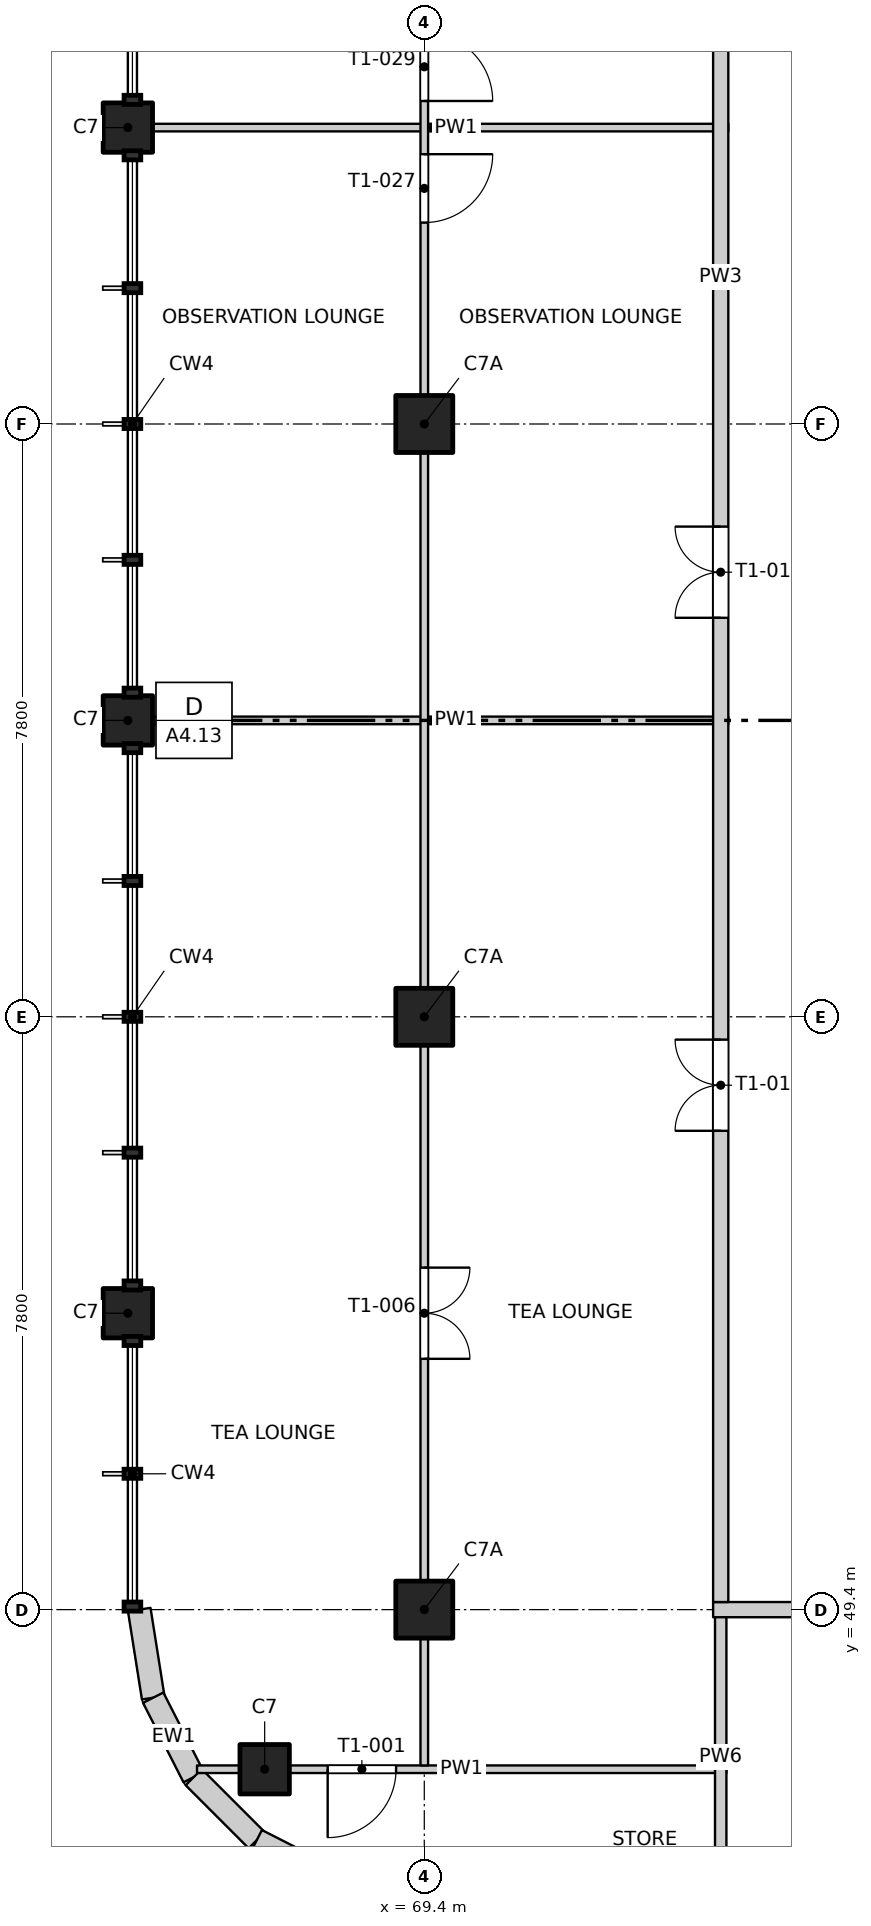
"""IFC4 building model, lengths in metres.
Left out: names, types, materials, properties, quantities, classifications, styles, units other than length and angle.
Written with IfcOpenShell. Run it as: python <this file> out.ifc"""

import sys

from ifc_helpers import new_model, si_unit, direction, frame, frame_2d, origin, origin_2d, place, context, subcontext, project, spatial, rectangle, extrude, element, fill, save


model = new_model("IFC4")
c1 = context("Model", 3, precision=1e-05, world=origin(), true_north=direction((0.0, 1.0)))
c2 = subcontext(c1, "Body", "Model", "MODEL_VIEW")
j1 = project(units=[si_unit("LENGTHUNIT", "METRE"), si_unit("PLANEANGLEUNIT", "RADIAN")], contexts=[c1])
p1 = place(None, origin())
s1 = spatial("IfcSite", under=j1, at=p1, CompositionType="ELEMENT")
p2 = place(p1, origin())
s2 = spatial("IfcBuilding", under=s1, at=p2, CompositionType="ELEMENT")
p3 = place(p2, frame((0.0, 0.0, 263.0)))
s3 = spatial("IfcBuildingStorey", under=s2, at=p3, CompositionType="ELEMENT", Elevation=263.0)
for number, where, z_axis, x_axis in (
    (1, (67.3, 47.3, -0.25), (0.0, 0.0, 1.0), (1.0, 0.0, 0.0)),
    (2, (65.5, 53.3, -0.25), (0.0, 0.0, 1.0), (1.0, 0.0, 0.0)),
    (3, (65.5, 61.1, -0.25), (0.0, 0.0, 1.0), (1.0, 0.0, 0.0)),
    (4, (65.5, 68.9, -0.25), (0.0, 0.0, 1.0), (1.0, 0.0, 0.0)),
):
    element("IfcColumn", number, at=place(p3, frame(where, z_axis=z_axis, x_axis=x_axis)), inside=s3, PredefinedType="COLUMN", context=c2, shape_type="SweptSolid", body=[
        extrude(rectangle(XDim=0.65, YDim=0.65, at=origin_2d()), origin(), (0.0, 0.0, 1.0), 3.35),
    ])
for number, where, z_axis, x_axis in (
    (5, (69.4, 49.4, -0.25), (0.0, 0.0, 1.0), (1.0, 0.0, 0.0)),
    (6, (69.4, 57.2, -0.25), (0.0, 0.0, 1.0), (1.0, 0.0, 0.0)),
    (7, (69.4, 65.0, -0.25), (0.0, 0.0, 1.0), (1.0, 0.0, 0.0)),
):
    element("IfcColumn", number, at=place(p3, frame(where, z_axis=z_axis, x_axis=x_axis)), inside=s3, PredefinedType="COLUMN", context=c2, shape_type="SweptSolid", body=[
        extrude(rectangle(XDim=0.75, YDim=0.75, at=origin_2d()), origin(), (0.0, 0.0, 1.0), 3.35),
    ])
p4 = place(p3, frame((65.65, 49.4, 0.0), z_axis=(0.0, 0.0, 1.0), x_axis=(0.156496880861, -0.987678452879, 0.0)))
e8 = element("IfcWall", 8, at=p4, inside=s3, PredefinedType="SOLIDWALL", context=c2, shape_type="SweptSolid", body=[
    extrude(rectangle(XDim=1.173, YDim=0.3, at=frame_2d((0.586, 0.0))), origin(), (0.0, 0.0, 1.0), 3.1),
])
p5 = place(p3, frame((65.833, 48.241, 0.0), z_axis=(0.0, 0.0, 1.0), x_axis=(0.454025524128, -0.890988677504, 0.0)))
e9 = element("IfcWall", 9, at=p5, inside=s3, PredefinedType="SOLIDWALL", context=c2, shape_type="SweptSolid", body=[
    extrude(rectangle(XDim=1.173, YDim=0.3, at=frame_2d((0.587, 0.0))), origin(), (0.0, 0.0, 1.0), 3.1),
])
p6 = place(p3, frame((66.366, 47.196, 0.0), z_axis=(0.0, 0.0, 1.0), x_axis=(0.707106781187, -0.707106781187, 0.0)))
e10 = element("IfcWall", 10, at=p6, inside=s3, PredefinedType="SOLIDWALL", context=c2, shape_type="SweptSolid", body=[
    extrude(rectangle(XDim=1.173, YDim=0.3, at=frame_2d((0.586, 0.0))), origin(), (0.0, 0.0, 1.0), 3.1),
])
p7 = place(p3, frame((67.196, 46.366, 0.0), z_axis=(0.0, 0.0, 1.0), x_axis=(0.890988677504, -0.454025524128, 0.0)))
e11 = element("IfcWall", 11, at=p7, inside=s3, PredefinedType="SOLIDWALL", context=c2, shape_type="SweptSolid", body=[
    extrude(rectangle(XDim=1.173, YDim=0.3, at=frame_2d((0.587, 0.0))), origin(), (0.0, 0.0, 1.0), 3.1),
])
p8 = place(p3, frame((66.41, 47.3, 0.0), z_axis=(0.0, 0.0, 1.0), x_axis=(1.0, 0.0, 0.0)))
e12 = element("IfcWall", 12, at=p8, inside=s3, PredefinedType="PARTITIONING", context=c2, shape_type="SweptSolid", body=[
    extrude(rectangle(XDim=6.965, YDim=0.1, at=frame_2d((3.482, 0.0))), origin(), (0.0, 0.0, 1.0), 3.1),
])
p9 = place(p8, frame((1.719, 0.0, 0.0)))
e13 = element("IfcOpeningElement", 13, at=p9, cuts=e12, PredefinedType="OPENING", context=c2, shape_type="SweptSolid", body=[
    extrude(rectangle(XDim=0.9, YDim=2.1, at=frame_2d((0.45, 1.05))), frame((0.0, 0.06, 0.0), z_axis=(0.0, -1.0, 0.0), x_axis=(1.0, 0.0, 0.0)), (0.0, 0.0, 1.0), 0.12),
])
p10 = place(p3, frame((73.2, 49.4, 0.0), z_axis=(0.0, 0.0, 1.0), x_axis=(1.0, 0.0, 0.0)))
e14 = element("IfcWall", 14, at=p10, inside=s3, PredefinedType="PARTITIONING", context=c2, shape_type="SweptSolid", body=[
    extrude(rectangle(XDim=23.6, YDim=0.2, at=frame_2d((11.8, 0.0))), origin(), (0.0, 0.0, 1.0), 3.1),
])
p11 = place(p10, frame((2.325, 0.0, 0.0)))
e15 = element("IfcOpeningElement", 15, at=p11, cuts=e14, PredefinedType="OPENING", context=c2, shape_type="SweptSolid", body=[
    extrude(rectangle(XDim=1.2, YDim=2.1, at=frame_2d((0.6, 1.05))), frame((0.0, 0.11, 0.0), z_axis=(0.0, -1.0, 0.0), x_axis=(1.0, 0.0, 0.0)), (0.0, 0.0, 1.0), 0.22),
])
p12 = place(p10, frame((12.3, 0.0, 0.0)))
e16 = element("IfcOpeningElement", 16, at=p12, cuts=e14, PredefinedType="OPENING", context=c2, shape_type="SweptSolid", body=[
    extrude(rectangle(XDim=1.2, YDim=2.1, at=frame_2d((0.6, 1.05))), frame((0.0, 0.11, 0.0), z_axis=(0.0, -1.0, 0.0), x_axis=(1.0, 0.0, 0.0)), (0.0, 0.0, 1.0), 0.22),
])
p13 = place(p10, frame((20.075, 0.0, 0.0)))
e17 = element("IfcOpeningElement", 17, at=p13, cuts=e14, PredefinedType="OPENING", context=c2, shape_type="SweptSolid", body=[
    extrude(rectangle(XDim=1.2, YDim=2.1, at=frame_2d((0.6, 1.05))), frame((0.0, 0.11, 0.0), z_axis=(0.0, -1.0, 0.0), x_axis=(1.0, 0.0, 0.0)), (0.0, 0.0, 1.0), 0.22),
])
for number, where, z_axis, x_axis in (
    (18, (65.635, 61.1, 0.0), (0.0, 0.0, 1.0), (1.0, 0.0, 0.0)),
    (19, (65.635, 68.9, 0.0), (0.0, 0.0, 1.0), (1.0, 0.0, 0.0)),
):
    element("IfcWall", number, at=place(p3, frame(where, z_axis=z_axis, x_axis=x_axis)), inside=s3, PredefinedType="PARTITIONING", context=c2, shape_type="SweptSolid", body=[
        extrude(rectangle(XDim=7.765, YDim=0.1, at=frame_2d((3.883, 0.0))), origin(), (0.0, 0.0, 1.0), 3.1),
    ])
p14 = place(p3, frame((69.4, 47.35, 0.0), z_axis=(0.0, 0.0, 1.0), x_axis=(0.0, 1.0, 0.0)))
e20 = element("IfcWall", 20, at=p14, inside=s3, PredefinedType="PARTITIONING", context=c2, shape_type="SweptSolid", body=[
    extrude(rectangle(XDim=29.3, YDim=0.1, at=frame_2d((14.65, 0.0))), origin(), (0.0, 0.0, 1.0), 3.1),
])
p15 = place(p14, frame((5.35, 0.0, 0.0)))
e21 = element("IfcOpeningElement", 21, at=p15, cuts=e20, PredefinedType="OPENING", context=c2, shape_type="SweptSolid", body=[
    extrude(rectangle(XDim=1.2, YDim=2.1, at=frame_2d((0.6, 1.05))), frame((0.0, 0.06, 0.0), z_axis=(0.0, -1.0, 0.0), x_axis=(1.0, 0.0, 0.0)), (0.0, 0.0, 1.0), 0.12),
])
p16 = place(p14, frame((20.3, 0.0, 0.0)))
e22 = element("IfcOpeningElement", 22, at=p16, cuts=e20, PredefinedType="OPENING", context=c2, shape_type="SweptSolid", body=[
    extrude(rectangle(XDim=0.9, YDim=2.1, at=frame_2d((0.45, 1.05))), frame((0.0, 0.06, 0.0), z_axis=(0.0, -1.0, 0.0), x_axis=(1.0, 0.0, 0.0)), (0.0, 0.0, 1.0), 0.12),
])
p17 = place(p14, frame((21.9, 0.0, 0.0)))
e23 = element("IfcOpeningElement", 23, at=p17, cuts=e20, PredefinedType="OPENING", context=c2, shape_type="SweptSolid", body=[
    extrude(rectangle(XDim=0.9, YDim=2.1, at=frame_2d((0.45, 1.05))), frame((0.0, 0.06, 0.0), z_axis=(0.0, -1.0, 0.0), x_axis=(1.0, 0.0, 0.0)), (0.0, 0.0, 1.0), 0.12),
])
p18 = place(p3, frame((73.3, 45.635, 0.0), z_axis=(0.0, 0.0, 1.0), x_axis=(0.0, 1.0, 0.0)))
e24 = element("IfcWall", 24, at=p18, inside=s3, PredefinedType="PARTITIONING", context=c2, shape_type="SweptSolid", body=[
    extrude(rectangle(XDim=3.665, YDim=0.15, at=frame_2d((1.833, 0.0))), origin(), (0.0, 0.0, 1.0), 3.1),
])
p19 = place(p3, frame((73.3, 49.5, 0.0), z_axis=(0.0, 0.0, 1.0), x_axis=(0.0, 1.0, 0.0)))
e25 = element("IfcWall", 25, at=p19, inside=s3, PredefinedType="PARTITIONING", context=c2, shape_type="SweptSolid", body=[
    extrude(rectangle(XDim=34.865, YDim=0.2, at=frame_2d((17.433, 0.0))), origin(), (0.0, 0.0, 1.0), 3.1),
])
p20 = place(p19, frame((6.2, 0.0, 0.0)))
e26 = element("IfcOpeningElement", 26, at=p20, cuts=e25, PredefinedType="OPENING", context=c2, shape_type="SweptSolid", body=[
    extrude(rectangle(XDim=1.2, YDim=2.1, at=frame_2d((0.6, 1.05))), frame((0.0, 0.11, 0.0), z_axis=(0.0, -1.0, 0.0), x_axis=(1.0, 0.0, 0.0)), (0.0, 0.0, 1.0), 0.22),
])
p21 = place(p19, frame((12.95, 0.0, 0.0)))
e27 = element("IfcOpeningElement", 27, at=p21, cuts=e25, PredefinedType="OPENING", context=c2, shape_type="SweptSolid", body=[
    extrude(rectangle(XDim=1.2, YDim=2.1, at=frame_2d((0.6, 1.05))), frame((0.0, 0.11, 0.0), z_axis=(0.0, -1.0, 0.0), x_axis=(1.0, 0.0, 0.0)), (0.0, 0.0, 1.0), 0.22),
])
p22 = place(p19, frame((24.65, 0.0, 0.0)))
e28 = element("IfcOpeningElement", 28, at=p22, cuts=e25, PredefinedType="OPENING", context=c2, shape_type="SweptSolid", body=[
    extrude(rectangle(XDim=1.2, YDim=2.1, at=frame_2d((0.6, 1.05))), frame((0.0, 0.11, 0.0), z_axis=(0.0, -1.0, 0.0), x_axis=(1.0, 0.0, 0.0)), (0.0, 0.0, 1.0), 0.22),
])
p23 = place(p19, frame((27.571, 0.0, 0.0)))
e29 = element("IfcOpeningElement", 29, at=p23, cuts=e25, PredefinedType="OPENING", context=c2, shape_type="SweptSolid", body=[
    extrude(rectangle(XDim=0.9, YDim=2.1, at=frame_2d((0.45, 1.05))), frame((0.0, 0.11, 0.0), z_axis=(0.0, -1.0, 0.0), x_axis=(1.0, 0.0, 0.0)), (0.0, 0.0, 1.0), 0.22),
])
p24 = place(p19, frame((32.45, 0.0, 0.0)))
e30 = element("IfcOpeningElement", 30, at=p24, cuts=e25, PredefinedType="OPENING", context=c2, shape_type="SweptSolid", body=[
    extrude(rectangle(XDim=1.2, YDim=2.1, at=frame_2d((0.6, 1.05))), frame((0.0, 0.11, 0.0), z_axis=(0.0, -1.0, 0.0), x_axis=(1.0, 0.0, 0.0)), (0.0, 0.0, 1.0), 0.22),
])
p25 = place(p9, origin())
e31 = element("IfcDoor", 31, at=p25, inside=s3, OperationType="SINGLE_SWING_RIGHT", PredefinedType="DOOR", context=c2, shape_type="SweptSolid", body=[
    extrude(rectangle(XDim=0.9, YDim=2.1, at=frame_2d((0.45, 1.05))), frame((0.0, 0.025, 0.0), z_axis=(0.0, -1.0, 0.0), x_axis=(1.0, 0.0, 0.0)), (0.0, 0.0, 1.0), 0.05),
])
fill(e13, e31)
p26 = place(p15, origin())
e32 = element("IfcDoor", 32, at=p26, inside=s3, OperationType="DOUBLE_DOOR_SINGLE_SWING", PredefinedType="DOOR", context=c2, shape_type="SweptSolid", body=[
    extrude(rectangle(XDim=1.2, YDim=2.1, at=frame_2d((0.6, 1.05))), frame((0.0, 0.025, 0.0), z_axis=(0.0, -1.0, 0.0), x_axis=(1.0, 0.0, 0.0)), (0.0, 0.0, 1.0), 0.05),
])
fill(e21, e32)
p27 = place(p20, origin())
e33 = element("IfcDoor", 33, at=p27, inside=s3, OperationType="DOUBLE_DOOR_SINGLE_SWING", PredefinedType="DOOR", context=c2, shape_type="SweptSolid", body=[
    extrude(rectangle(XDim=1.2, YDim=2.1, at=frame_2d((0.6, 1.05))), frame((0.0, 0.025, 0.0), z_axis=(0.0, -1.0, 0.0), x_axis=(1.0, 0.0, 0.0)), (0.0, 0.0, 1.0), 0.05),
])
fill(e26, e33)
p28 = place(p21, origin())
e34 = element("IfcDoor", 34, at=p28, inside=s3, OperationType="DOUBLE_DOOR_SINGLE_SWING", PredefinedType="DOOR", context=c2, shape_type="SweptSolid", body=[
    extrude(rectangle(XDim=1.2, YDim=2.1, at=frame_2d((0.6, 1.05))), frame((0.0, 0.025, 0.0), z_axis=(0.0, -1.0, 0.0), x_axis=(1.0, 0.0, 0.0)), (0.0, 0.0, 1.0), 0.05),
])
fill(e27, e34)
p29 = place(p16, origin())
e35 = element("IfcDoor", 35, at=p29, inside=s3, OperationType="SINGLE_SWING_LEFT", PredefinedType="DOOR", context=c2, shape_type="SweptSolid", body=[
    extrude(rectangle(XDim=0.9, YDim=2.1, at=frame_2d((0.45, 1.05))), frame((0.0, 0.025, 0.0), z_axis=(0.0, -1.0, 0.0), x_axis=(1.0, 0.0, 0.0)), (0.0, 0.0, 1.0), 0.05),
])
fill(e22, e35)
p30 = place(p17, origin())
e36 = element("IfcDoor", 36, at=p30, inside=s3, OperationType="SINGLE_SWING_RIGHT", PredefinedType="DOOR", context=c2, shape_type="SweptSolid", body=[
    extrude(rectangle(XDim=0.9, YDim=2.1, at=frame_2d((0.45, 1.05))), frame((0.0, 0.025, 0.0), z_axis=(0.0, -1.0, 0.0), x_axis=(1.0, 0.0, 0.0)), (0.0, 0.0, 1.0), 0.05),
])
fill(e23, e36)
save(model, sys.argv[1])
